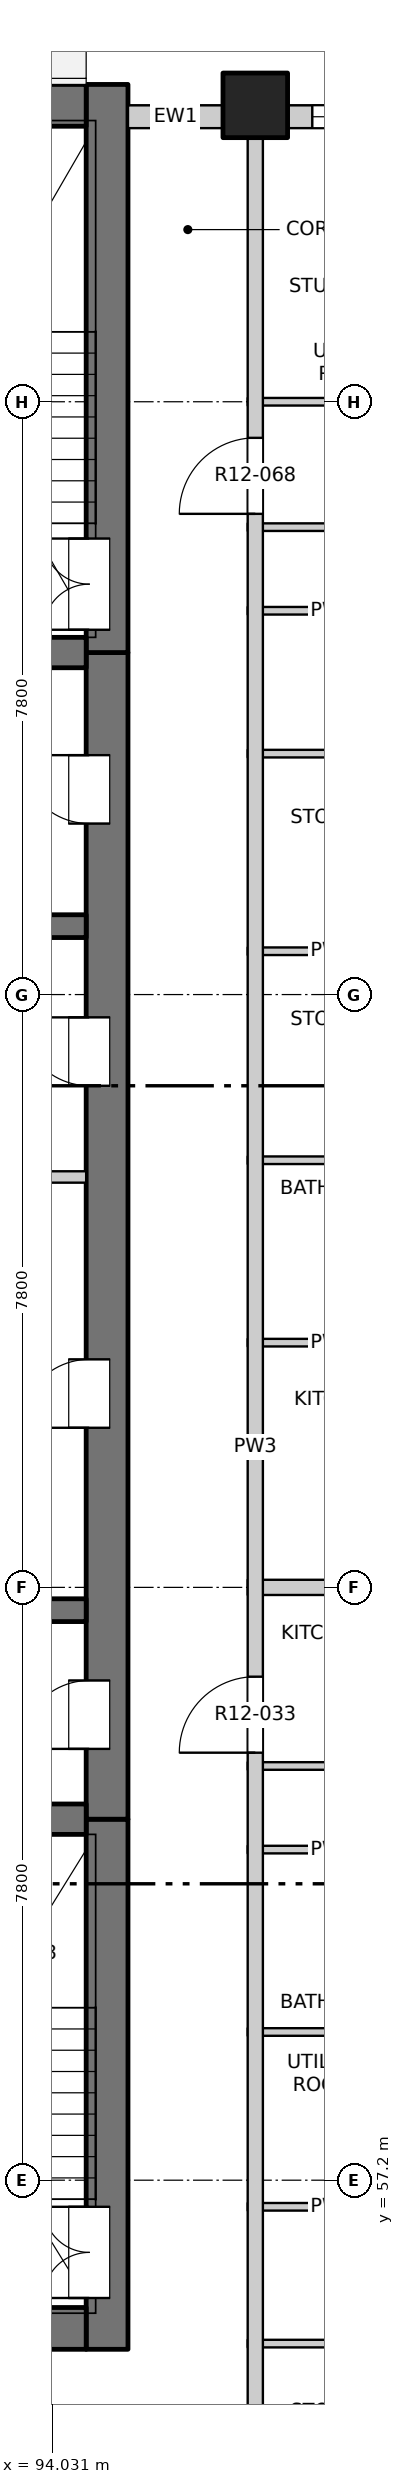
"""IFC4 building model, lengths in metres.
Left out: names, types, materials, properties, quantities, classifications, styles, units other than length and angle.
Written with IfcOpenShell. Run it as: python <this file> out.ifc"""

import sys

from ifc_helpers import new_model, si_unit, direction, frame, frame_2d, origin, origin_2d, place, context, subcontext, project, spatial, rectangle, extrude, element, fill, save


model = new_model("IFC4")
c1 = context("Model", 3, precision=1e-05, world=origin(), true_north=direction((0.0, 1.0)))
c2 = subcontext(c1, "Body", "Model", "MODEL_VIEW")
j1 = project(units=[si_unit("LENGTHUNIT", "METRE"), si_unit("PLANEANGLEUNIT", "RADIAN")], contexts=[c1])
p1 = place(None, origin())
s1 = spatial("IfcSite", under=j1, at=p1, CompositionType="ELEMENT")
p2 = place(p1, origin())
s2 = spatial("IfcBuilding", under=s1, at=p2, CompositionType="ELEMENT")
p3 = place(p2, frame((0.0, 0.0, 137.3)))
s3 = spatial("IfcBuildingStorey", under=s2, at=p3, CompositionType="ELEMENT", Elevation=137.3)
p4 = place(p3, frame((96.7, 84.5, -0.25), z_axis=(0.0, 0.0, 1.0), x_axis=(1.0, 0.0, 0.0)))
e1 = element("IfcColumn", 1, at=p4, inside=s3, PredefinedType="COLUMN", context=c2, shape_type="SweptSolid", body=[
    extrude(rectangle(XDim=0.85, YDim=0.85, at=origin_2d()), origin(), (0.0, 0.0, 1.0), 3.4),
])
p5 = place(p3, frame((94.75, 54.975, -0.25), z_axis=(0.0, 0.0, 1.0), x_axis=(0.0, 1.0, 0.0)))
e2 = element("IfcWall", 2, at=p5, inside=s3, PredefinedType="SOLIDWALL", context=c2, shape_type="SweptSolid", body=[
    extrude(rectangle(XDim=6.975, YDim=0.55, at=frame_2d((3.487, 0.0))), origin(), (0.0, 0.0, 1.0), 3.4),
])
p6 = place(p5, frame((0.675, 0.0, 0.25)))
e3 = element("IfcOpeningElement", 3, at=p6, cuts=e2, PredefinedType="OPENING", context=c2, shape_type="SweptSolid", body=[
    extrude(rectangle(XDim=1.2, YDim=2.1, at=frame_2d((0.6, 1.05))), frame((0.0, 0.285, 0.0), z_axis=(0.0, -1.0, 0.0), x_axis=(1.0, 0.0, 0.0)), (0.0, 0.0, 1.0), 0.57),
])
p7 = place(p3, frame((94.75, 61.95, -0.25), z_axis=(0.0, 0.0, 1.0), x_axis=(0.0, 1.0, 0.0)))
e4 = element("IfcWall", 4, at=p7, inside=s3, PredefinedType="SOLIDWALL", context=c2, shape_type="SweptSolid", body=[
    extrude(rectangle(XDim=15.35, YDim=0.55, at=frame_2d((7.675, 0.0))), origin(), (0.0, 0.0, 1.0), 3.4),
])
p8 = place(p7, frame((0.925, 0.0, 0.25)))
e5 = element("IfcOpeningElement", 5, at=p8, cuts=e4, PredefinedType="OPENING", context=c2, shape_type="SweptSolid", body=[
    extrude(rectangle(XDim=0.9, YDim=2.1, at=frame_2d((0.45, 1.05))), frame((0.0, 0.285, 0.0), z_axis=(0.0, -1.0, 0.0), x_axis=(1.0, 0.0, 0.0)), (0.0, 0.0, 1.0), 0.57),
])
p9 = place(p7, frame((5.15, 0.0, 0.25)))
e6 = element("IfcOpeningElement", 6, at=p9, cuts=e4, PredefinedType="OPENING", context=c2, shape_type="SweptSolid", body=[
    extrude(rectangle(XDim=0.9, YDim=2.1, at=frame_2d((0.45, 1.05))), frame((0.0, 0.285, 0.0), z_axis=(0.0, -1.0, 0.0), x_axis=(1.0, 0.0, 0.0)), (0.0, 0.0, 1.0), 0.57),
])
p10 = place(p7, frame((9.65, 0.0, 0.25)))
e7 = element("IfcOpeningElement", 7, at=p10, cuts=e4, PredefinedType="OPENING", context=c2, shape_type="SweptSolid", body=[
    extrude(rectangle(XDim=0.9, YDim=2.1, at=frame_2d((0.45, 1.05))), frame((0.0, 0.285, 0.0), z_axis=(0.0, -1.0, 0.0), x_axis=(1.0, 0.0, 0.0)), (0.0, 0.0, 1.0), 0.57),
])
p11 = place(p7, frame((13.1, 0.0, 0.25)))
e8 = element("IfcOpeningElement", 8, at=p11, cuts=e4, PredefinedType="OPENING", context=c2, shape_type="SweptSolid", body=[
    extrude(rectangle(XDim=0.9, YDim=2.1, at=frame_2d((0.45, 1.05))), frame((0.0, 0.285, 0.0), z_axis=(0.0, -1.0, 0.0), x_axis=(1.0, 0.0, 0.0)), (0.0, 0.0, 1.0), 0.57),
])
p12 = place(p3, frame((94.75, 77.3, -0.25), z_axis=(0.0, 0.0, 1.0), x_axis=(0.0, 1.0, 0.0)))
e9 = element("IfcWall", 9, at=p12, inside=s3, PredefinedType="SOLIDWALL", context=c2, shape_type="SweptSolid", body=[
    extrude(rectangle(XDim=7.475, YDim=0.55, at=frame_2d((3.737, 0.0))), origin(), (0.0, 0.0, 1.0), 3.4),
])
p13 = place(p12, frame((0.3, 0.0, 0.25)))
e10 = element("IfcOpeningElement", 10, at=p13, cuts=e9, PredefinedType="OPENING", context=c2, shape_type="SweptSolid", body=[
    extrude(rectangle(XDim=1.2, YDim=2.1, at=frame_2d((0.6, 1.05))), frame((0.0, 0.285, 0.0), z_axis=(0.0, -1.0, 0.0), x_axis=(1.0, 0.0, 0.0)), (0.0, 0.0, 1.0), 0.57),
])
p14 = place(p3, frame((75.525, 55.25, -0.25), z_axis=(0.0, 0.0, 1.0), x_axis=(1.0, 0.0, 0.0)))
e11 = element("IfcWall", 11, at=p14, inside=s3, PredefinedType="SOLIDWALL", context=c2, shape_type="SweptSolid", body=[
    extrude(rectangle(XDim=18.95, YDim=0.55, at=frame_2d((9.475, 0.0))), origin(), (0.0, 0.0, 1.0), 3.4),
])
p15 = place(p14, frame((8.725, 0.0, 0.25)))
e12 = element("IfcOpeningElement", 12, at=p15, cuts=e11, PredefinedType="OPENING", context=c2, shape_type="SweptSolid", body=[
    extrude(rectangle(XDim=1.5, YDim=2.1, at=frame_2d((0.75, 1.05))), frame((0.0, 0.285, 0.0), z_axis=(0.0, -1.0, 0.0), x_axis=(1.0, 0.0, 0.0)), (0.0, 0.0, 1.0), 0.57),
])
p16 = place(p3, frame((75.525, 84.5, -0.25), z_axis=(0.0, 0.0, 1.0), x_axis=(1.0, 0.0, 0.0)))
e13 = element("IfcWall", 13, at=p16, inside=s3, PredefinedType="SOLIDWALL", context=c2, shape_type="SweptSolid", body=[
    extrude(rectangle(XDim=18.95, YDim=0.55, at=frame_2d((9.475, 0.0))), origin(), (0.0, 0.0, 1.0), 3.4),
])
p17 = place(p3, frame((90.7, 61.95, -0.25), z_axis=(0.0, 0.0, 1.0), x_axis=(1.0, 0.0, 0.0)))
e14 = element("IfcWall", 14, at=p17, inside=s3, PredefinedType="SOLIDWALL", context=c2, shape_type="SweptSolid", body=[
    extrude(rectangle(XDim=3.775, YDim=0.4, at=frame_2d((1.888, 0.0))), origin(), (0.0, 0.0, 1.0), 3.4),
])
for number, where, z_axis, x_axis in (
    (15, (90.7, 64.7, -0.25), (0.0, 0.0, 1.0), (1.0, 0.0, 0.0)),
    (16, (90.7, 73.7, -0.25), (0.0, 0.0, 1.0), (1.0, 0.0, 0.0)),
):
    element("IfcWall", number, at=place(p3, frame(where, z_axis=z_axis, x_axis=x_axis)), inside=s3, PredefinedType="SOLIDWALL", context=c2, shape_type="SweptSolid", body=[
        extrude(rectangle(XDim=3.775, YDim=0.3, at=frame_2d((1.888, 0.0))), origin(), (0.0, 0.0, 1.0), 3.4),
    ])
p18 = place(p3, frame((90.7, 77.3, -0.25), z_axis=(0.0, 0.0, 1.0), x_axis=(1.0, 0.0, 0.0)))
e17 = element("IfcWall", 17, at=p18, inside=s3, PredefinedType="SOLIDWALL", context=c2, shape_type="SweptSolid", body=[
    extrude(rectangle(XDim=3.775, YDim=0.4, at=frame_2d((1.888, 0.0))), origin(), (0.0, 0.0, 1.0), 3.4),
])
p19 = place(p3, frame((95.025, 84.35, 0.0), z_axis=(0.0, 0.0, 1.0), x_axis=(1.0, 0.0, 0.0)))
e18 = element("IfcWall", 18, at=p19, inside=s3, PredefinedType="SOLIDWALL", context=c2, shape_type="SweptSolid", body=[
    extrude(rectangle(XDim=1.25, YDim=0.3, at=frame_2d((0.625, 0.0))), origin(), (0.0, 0.0, 1.0), 2.7),
])
p20 = place(p3, frame((97.125, 84.35, 0.0), z_axis=(0.0, 0.0, 1.0), x_axis=(1.0, 0.0, 0.0)))
e19 = element("IfcWall", 19, at=p20, inside=s3, PredefinedType="SOLIDWALL", context=c2, shape_type="SweptSolid", body=[
    extrude(rectangle(XDim=3.475, YDim=0.3, at=frame_2d((1.738, 0.0))), origin(), (0.0, 0.0, 1.0), 2.7),
])
p21 = place(p20, frame((0.325, 0.0, 0.9)))
e20 = element("IfcOpeningElement", 20, at=p21, cuts=e19, PredefinedType="OPENING", context=c2, shape_type="SweptSolid", body=[
    extrude(rectangle(XDim=2.4, YDim=1.8, at=frame_2d((1.2, 0.9))), frame((0.0, 0.16, 0.0), z_axis=(0.0, -1.0, 0.0), x_axis=(1.0, 0.0, 0.0)), (0.0, 0.0, 1.0), 0.32),
])
for number, where, z_axis, x_axis in (
    (21, (96.6, 55.05, 0.0), (0.0, 0.0, 1.0), (1.0, 0.0, 0.0)),
    (22, (96.6, 56.85, 0.0), (0.0, 0.0, 1.0), (1.0, 0.0, 0.0)),
    (23, (96.6, 59.15, 0.0), (0.0, 0.0, 1.0), (1.0, 0.0, 0.0)),
    (24, (96.6, 61.55, 0.0), (0.0, 0.0, 1.0), (1.0, 0.0, 0.0)),
    (25, (96.6, 62.65, 0.0), (0.0, 0.0, 1.0), (1.0, 0.0, 0.0)),
):
    element("IfcWall", number, at=place(p3, frame(where, z_axis=z_axis, x_axis=x_axis)), inside=s3, PredefinedType="PARTITIONING", context=c2, shape_type="SweptSolid", body=[
        extrude(rectangle(XDim=2.22, YDim=0.1, at=frame_2d((1.11, 0.0))), origin(), (0.0, 0.0, 1.0), 3.15),
    ])
p22 = place(p3, frame((96.6, 65.0, 0.0), z_axis=(0.0, 0.0, 1.0), x_axis=(1.0, 0.0, 0.0)))
e26 = element("IfcWall", 26, at=p22, inside=s3, PredefinedType="PARTITIONING", context=c2, shape_type="SweptSolid", body=[
    extrude(rectangle(XDim=7.6, YDim=0.2, at=frame_2d((3.8, 0.0))), origin(), (0.0, 0.0, 1.0), 3.15),
])
p23 = place(p3, frame((96.6, 68.22, 0.0), z_axis=(0.0, 0.0, 1.0), x_axis=(1.0, 0.0, 0.0)))
e27 = element("IfcWall", 27, at=p23, inside=s3, PredefinedType="PARTITIONING", context=c2, shape_type="SweptSolid", body=[
    extrude(rectangle(XDim=2.22, YDim=0.1, at=frame_2d((1.11, 0.0))), origin(), (0.0, 0.0, 1.0), 3.15),
])
p24 = place(p3, frame((90.7, 70.4, 0.0), z_axis=(0.0, 0.0, 1.0), x_axis=(1.0, 0.0, 0.0)))
e28 = element("IfcWall", 28, at=p24, inside=s3, PredefinedType="PARTITIONING", context=c2, shape_type="SweptSolid", body=[
    extrude(rectangle(XDim=3.775, YDim=0.15, at=frame_2d((1.887, 0.0))), origin(), (0.0, 0.0, 1.0), 3.15),
])
for number, where, z_axis, x_axis in (
    (29, (96.6, 70.62, 0.0), (0.0, 0.0, 1.0), (1.0, 0.0, 0.0)),
    (30, (96.6, 73.37, 0.0), (0.0, 0.0, 1.0), (1.0, 0.0, 0.0)),
    (31, (96.6, 75.97, 0.0), (0.0, 0.0, 1.0), (1.0, 0.0, 0.0)),
    (32, (96.6, 77.85, 0.0), (0.0, 0.0, 1.0), (1.0, 0.0, 0.0)),
    (33, (96.6, 78.95, 0.0), (0.0, 0.0, 1.0), (1.0, 0.0, 0.0)),
):
    element("IfcWall", number, at=place(p3, frame(where, z_axis=z_axis, x_axis=x_axis)), inside=s3, PredefinedType="PARTITIONING", context=c2, shape_type="SweptSolid", body=[
        extrude(rectangle(XDim=2.22, YDim=0.1, at=frame_2d((1.11, 0.0))), origin(), (0.0, 0.0, 1.0), 3.15),
    ])
p25 = place(p3, frame((96.6, 80.6, 0.0), z_axis=(0.0, 0.0, 1.0), x_axis=(1.0, 0.0, 0.0)))
e34 = element("IfcWall", 34, at=p25, inside=s3, PredefinedType="PARTITIONING", context=c2, shape_type="SweptSolid", body=[
    extrude(rectangle(XDim=7.6, YDim=0.1, at=frame_2d((3.8, 0.0))), origin(), (0.0, 0.0, 1.0), 3.15),
])
p26 = place(p25, frame((2.51, 0.0, 0.0)))
e35 = element("IfcOpeningElement", 35, at=p26, cuts=e34, PredefinedType="OPENING", context=c2, shape_type="SweptSolid", body=[
    extrude(rectangle(XDim=0.9, YDim=2.1, at=frame_2d((0.45, 1.05))), frame((0.0, 0.06, 0.0), z_axis=(0.0, -1.0, 0.0), x_axis=(1.0, 0.0, 0.0)), (0.0, 0.0, 1.0), 0.12),
])
p27 = place(p3, frame((96.7, 49.5, 0.0), z_axis=(0.0, 0.0, 1.0), x_axis=(0.0, 1.0, 0.0)))
e36 = element("IfcWall", 36, at=p27, inside=s3, PredefinedType="PARTITIONING", context=c2, shape_type="SweptSolid", body=[
    extrude(rectangle(XDim=34.7, YDim=0.2, at=frame_2d((17.35, 0.0))), origin(), (0.0, 0.0, 1.0), 3.15),
])
p28 = place(p27, frame((13.325, 0.0, 0.0)))
e37 = element("IfcOpeningElement", 37, at=p28, cuts=e36, PredefinedType="OPENING", context=c2, shape_type="SweptSolid", body=[
    extrude(rectangle(XDim=1.0, YDim=2.1, at=frame_2d((0.5, 1.05))), frame((0.0, 0.11, 0.0), z_axis=(0.0, -1.0, 0.0), x_axis=(1.0, 0.0, 0.0)), (0.0, 0.0, 1.0), 0.22),
])
p29 = place(p27, frame((29.625, 0.0, 0.0)))
e38 = element("IfcOpeningElement", 38, at=p29, cuts=e36, PredefinedType="OPENING", context=c2, shape_type="SweptSolid", body=[
    extrude(rectangle(XDim=1.0, YDim=2.1, at=frame_2d((0.5, 1.05))), frame((0.0, 0.11, 0.0), z_axis=(0.0, -1.0, 0.0), x_axis=(1.0, 0.0, 0.0)), (0.0, 0.0, 1.0), 0.22),
])
p30 = place(p21, origin())
e39 = element("IfcWindow", 39, at=p30, inside=s3, PartitioningType="DOUBLE_PANEL_VERTICAL", PredefinedType="WINDOW", context=c2, shape_type="SweptSolid", body=[
    extrude(rectangle(XDim=2.4, YDim=1.8, at=frame_2d((1.2, 0.9))), frame((0.0, 0.03, 0.0), z_axis=(0.0, -1.0, 0.0), x_axis=(1.0, 0.0, 0.0)), (0.0, 0.0, 1.0), 0.06),
])
fill(e20, e39)
p31 = place(p6, origin())
e40 = element("IfcDoor", 40, at=p31, inside=s3, OperationType="DOUBLE_DOOR_SINGLE_SWING", PredefinedType="DOOR", context=c2, shape_type="SweptSolid", body=[
    extrude(rectangle(XDim=1.2, YDim=2.1, at=frame_2d((0.6, 1.05))), frame((0.0, 0.26, 0.0), z_axis=(0.0, -1.0, 0.0), x_axis=(1.0, 0.0, 0.0)), (0.0, 0.0, 1.0), 0.05),
])
fill(e3, e40)
p32 = place(p8, origin())
e41 = element("IfcDoor", 41, at=p32, inside=s3, OperationType="SINGLE_SWING_LEFT", PredefinedType="DOOR", context=c2, shape_type="SweptSolid", body=[
    extrude(rectangle(XDim=0.9, YDim=2.1, at=frame_2d((0.45, 1.05))), frame((0.0, 0.26, 0.0), z_axis=(0.0, -1.0, 0.0), x_axis=(1.0, 0.0, 0.0)), (0.0, 0.0, 1.0), 0.05),
])
fill(e5, e41)
p33 = place(p28, origin())
e42 = element("IfcDoor", 42, at=p33, inside=s3, OperationType="SINGLE_SWING_LEFT", PredefinedType="DOOR", context=c2, shape_type="SweptSolid", body=[
    extrude(rectangle(XDim=1.0, YDim=2.1, at=frame_2d((0.5, 1.05))), frame((0.0, 0.025, 0.0), z_axis=(0.0, -1.0, 0.0), x_axis=(1.0, 0.0, 0.0)), (0.0, 0.0, 1.0), 0.05),
])
fill(e37, e42)
p34 = place(p9, origin())
e43 = element("IfcDoor", 43, at=p34, inside=s3, OperationType="SINGLE_SWING_LEFT", PredefinedType="DOOR", context=c2, shape_type="SweptSolid", body=[
    extrude(rectangle(XDim=0.9, YDim=2.1, at=frame_2d((0.45, 1.05))), frame((0.0, 0.26, 0.0), z_axis=(0.0, -1.0, 0.0), x_axis=(1.0, 0.0, 0.0)), (0.0, 0.0, 1.0), 0.05),
])
fill(e6, e43)
p35 = place(p10, origin())
e44 = element("IfcDoor", 44, at=p35, inside=s3, OperationType="SINGLE_SWING_RIGHT", PredefinedType="DOOR", context=c2, shape_type="SweptSolid", body=[
    extrude(rectangle(XDim=0.9, YDim=2.1, at=frame_2d((0.45, 1.05))), frame((0.0, 0.26, 0.0), z_axis=(0.0, -1.0, 0.0), x_axis=(1.0, 0.0, 0.0)), (0.0, 0.0, 1.0), 0.05),
])
fill(e7, e44)
p36 = place(p11, origin())
e45 = element("IfcDoor", 45, at=p36, inside=s3, OperationType="SINGLE_SWING_RIGHT", PredefinedType="DOOR", context=c2, shape_type="SweptSolid", body=[
    extrude(rectangle(XDim=0.9, YDim=2.1, at=frame_2d((0.45, 1.05))), frame((0.0, 0.26, 0.0), z_axis=(0.0, -1.0, 0.0), x_axis=(1.0, 0.0, 0.0)), (0.0, 0.0, 1.0), 0.05),
])
fill(e8, e45)
p37 = place(p13, origin())
e46 = element("IfcDoor", 46, at=p37, inside=s3, OperationType="DOUBLE_DOOR_SINGLE_SWING", PredefinedType="DOOR", context=c2, shape_type="SweptSolid", body=[
    extrude(rectangle(XDim=1.2, YDim=2.1, at=frame_2d((0.6, 1.05))), frame((0.0, 0.26, 0.0), z_axis=(0.0, -1.0, 0.0), x_axis=(1.0, 0.0, 0.0)), (0.0, 0.0, 1.0), 0.05),
])
fill(e10, e46)
p38 = place(p29, origin())
e47 = element("IfcDoor", 47, at=p38, inside=s3, OperationType="SINGLE_SWING_LEFT", PredefinedType="DOOR", context=c2, shape_type="SweptSolid", body=[
    extrude(rectangle(XDim=1.0, YDim=2.1, at=frame_2d((0.5, 1.05))), frame((0.0, 0.025, 0.0), z_axis=(0.0, -1.0, 0.0), x_axis=(1.0, 0.0, 0.0)), (0.0, 0.0, 1.0), 0.05),
])
fill(e38, e47)
save(model, sys.argv[1])
